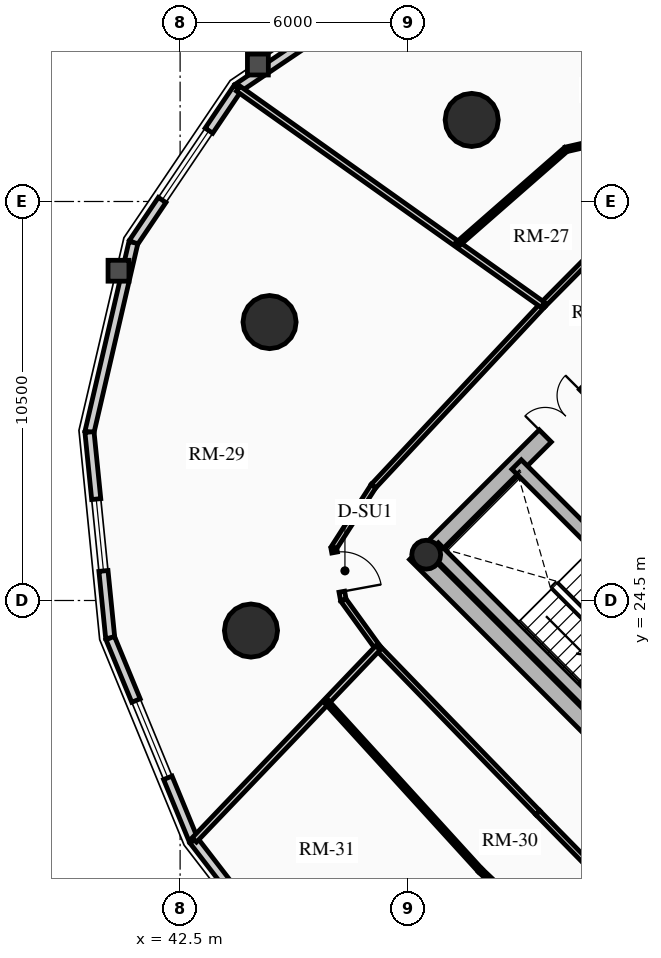
"""IFC4 building model, lengths in metres.
Left out: names, types, materials, properties, quantities, classifications, styles, units other than length and angle.
Written with IfcOpenShell. Run it as: python <this file> out.ifc"""

import sys

from ifc_helpers import new_model, si_unit, direction, frame, frame_2d, origin, origin_2d, place, context, subcontext, project, spatial, rectangle, circle, hollow_circle, extrude, source, transform, mapped, element, fill, save


model = new_model("IFC4")
c1 = context("Model", 3, precision=1e-05, world=origin(), true_north=direction((0.0, 1.0)))
c2 = subcontext(c1, "Body", "Model", "MODEL_VIEW")
j1 = project(units=[si_unit("LENGTHUNIT", "METRE"), si_unit("PLANEANGLEUNIT", "RADIAN")], contexts=[c1])
p1 = place(None, origin())
s1 = spatial("IfcSite", under=j1, at=p1, CompositionType="ELEMENT")
p2 = place(p1, origin())
s2 = spatial("IfcBuilding", under=s1, at=p2, CompositionType="ELEMENT")
p3 = place(p2, frame((0.0, 0.0, 107.98)))
s3 = spatial("IfcBuildingStorey", under=s2, at=p3, CompositionType="ELEMENT", Elevation=107.98)
p4 = place(p3, frame((58.737, 15.697, 0.0), z_axis=(0.0, 0.0, 1.0), x_axis=(-0.707106781187, 0.707106781187, 0.0)))
e1 = element("IfcWall", 1, at=p4, inside=s3, PredefinedType="SHEAR", context=c2, shape_type="SweptSolid", body=[
    extrude(rectangle(XDim=14.2, YDim=0.45, at=frame_2d((7.1, 0.0))), origin(), (0.0, 0.0, 1.0), 2.91),
])
p5 = place(p3, frame((48.856, 25.578, 0.0), z_axis=(0.0, 0.0, 1.0), x_axis=(0.707106781187, 0.707106781187, 0.0)))
e2 = element("IfcWall", 2, at=p5, inside=s3, PredefinedType="SHEAR", context=c2, shape_type="SweptSolid", body=[
    extrude(rectangle(XDim=10.7, YDim=0.45, at=frame_2d((5.35, 0.0))), origin(), (0.0, 0.0, 1.0), 2.91),
])
m1 = source(origin(), c2, "Body", "SweptSolid", [
    extrude(rectangle(XDim=1.5, YDim=2.02, at=frame_2d((0.75, 1.01))), frame((0.0, 0.235, 0.0), z_axis=(0.0, -1.0, 0.0), x_axis=(1.0, 0.0, 0.0)), (0.0, 0.0, 1.0), 0.47),
])
p6 = place(p5, frame((4.6, 0.0, 0.0)))
e3 = element("IfcOpeningElement", 3, at=p6, cuts=e2, PredefinedType="OPENING", context=c2, shape_type="MappedRepresentation", body=[
    mapped(m1, transform((0.0, 0.0, 0.0), x_axis=(1.0, 0.0, 0.0), y_axis=(0.0, 1.0, 0.0), z_axis=(0.0, 0.0, 1.0), scale=1.0)),
])
p7 = place(p3, frame((61.078, 18.355, 0.0), z_axis=(0.0, 0.0, 1.0), x_axis=(-0.707106781187, 0.707106781187, 0.0)))
e4 = element("IfcWall", 4, at=p7, inside=s3, PredefinedType="SHEAR", context=c2, shape_type="SweptSolid", body=[
    extrude(rectangle(XDim=13.75, YDim=0.35, at=frame_2d((6.875, 0.0))), origin(), (0.0, 0.0, 1.0), 2.91),
])
m2 = source(origin(), c2, "Body", "SweptSolid", [
    extrude(rectangle(XDim=1.1, YDim=2.015, at=frame_2d((0.55, 1.007))), frame((0.0, 0.185, 0.0), z_axis=(0.0, -1.0, 0.0), x_axis=(1.0, 0.0, 0.0)), (0.0, 0.0, 1.0), 0.37),
])
p8 = place(p7, frame((4.875, 0.0, 0.0)))
e5 = element("IfcOpeningElement", 5, at=p8, cuts=e4, PredefinedType="OPENING", context=c2, shape_type="MappedRepresentation", body=[
    mapped(m2, transform((0.0, 0.0, 0.0), x_axis=(1.0, 0.0, 0.0), y_axis=(0.0, 1.0, 0.0), z_axis=(0.0, 0.0, 1.0), scale=1.0)),
])
m3 = source(origin(), c2, "Body", "SweptSolid", [
    extrude(rectangle(XDim=1.15, YDim=2.02, at=frame_2d((0.575, 1.01))), frame((0.0, 0.185, 0.0), z_axis=(0.0, -1.0, 0.0), x_axis=(1.0, 0.0, 0.0)), (0.0, 0.0, 1.0), 0.37),
])
p9 = place(p7, frame((7.295, 0.0, 0.0)))
e6 = element("IfcOpeningElement", 6, at=p9, cuts=e4, PredefinedType="OPENING", context=c2, shape_type="MappedRepresentation", body=[
    mapped(m3, transform((0.0, 0.0, 0.0), x_axis=(1.0, 0.0, 0.0), y_axis=(0.0, 1.0, 0.0), z_axis=(0.0, 0.0, 1.0), scale=1.0)),
])
p10 = place(p3, frame((53.922, 21.141, 0.0), z_axis=(0.0, 0.0, 1.0), x_axis=(-0.707088616009, 0.707124945897, 0.0)))
e7 = element("IfcWall", 7, at=p10, inside=s3, PredefinedType="SHEAR", context=c2, shape_type="SweptSolid", body=[
    extrude(rectangle(XDim=6.72, YDim=0.35, at=frame_2d((3.36, 0.0))), origin(), (0.0, 0.0, 1.0), 2.91),
])
p11 = place(p3, frame((48.976, 25.706, 0.0), z_axis=(0.0, 0.0, 1.0), x_axis=(0.707106781187, 0.707106781187, 0.0)))
e8 = element("IfcColumn", 8, at=p11, inside=s3, PredefinedType="COLUMN", context=c2, shape_type="SweptSolid", body=[
    extrude(hollow_circle(Radius=0.38, WallThickness=0.032, at=origin_2d()), origin(), (0.0, 0.0, 1.0), 2.91),
])
for number, where, z_axis, x_axis in (
    (9, (50.173, 37.146, 0.0), (0.0, 0.0, 1.0), (1.0, 0.0, 0.0)),
    (10, (44.854, 31.827, 0.0), (0.0, 0.0, 1.0), (1.0, 0.0, 0.0)),
    (11, (44.365, 23.709, 0.0), (0.0, 0.0, 1.0), (1.0, 0.0, 0.0)),
):
    element("IfcColumn", number, at=place(p3, frame(where, z_axis=z_axis, x_axis=x_axis)), inside=s3, PredefinedType="USERDEFINED", context=c2, shape_type="SweptSolid", body=[
        extrude(circle(Radius=0.7, at=origin_2d()), origin(), (0.0, 0.0, 1.0), 2.91),
    ])
p12 = place(p3, frame((44.015, 37.985, 0.0), z_axis=(0.0, 0.0, 1.0), x_axis=(0.828781148131, 0.559572880421, 0.0)))
e12 = element("IfcWall", 12, at=p12, inside=s3, PredefinedType="SOLIDWALL", context=c2, shape_type="SweptSolid", body=[
    extrude(rectangle(XDim=4.905, YDim=0.24, at=frame_2d((2.452, 0.0))), origin(), (0.0, 0.0, 1.0), 2.179),
])
p13 = place(p3, frame((41.271, 33.92, 0.0), z_axis=(0.0, 0.0, 1.0), x_axis=(0.559572880421, 0.828781148131, 0.0)))
e13 = element("IfcWall", 13, at=p13, inside=s3, PredefinedType="SOLIDWALL", context=c2, shape_type="SweptSolid", body=[
    extrude(rectangle(XDim=4.905, YDim=0.24, at=frame_2d((2.452, 0.0))), origin(), (0.0, 0.0, 1.0), 2.179),
])
m4 = source(origin(), c2, "Body", "SweptSolid", [
    extrude(rectangle(XDim=2.2, YDim=1.35, at=frame_2d((1.1, 0.675))), frame((0.0, 0.13, 0.0), z_axis=(0.0, -1.0, 0.0), x_axis=(1.0, 0.0, 0.0)), (0.0, 0.0, 1.0), 0.26),
])
p14 = place(p13, frame((1.352, 0.0, 0.65)))
e14 = element("IfcOpeningElement", 14, at=p14, cuts=e13, PredefinedType="OPENING", context=c2, shape_type="MappedRepresentation", body=[
    mapped(m4, transform((0.0, 0.0, 0.0), x_axis=(1.0, 0.0, 0.0), y_axis=(0.0, 1.0, 0.0), z_axis=(0.0, 0.0, 1.0), scale=1.0)),
])
p15 = place(p3, frame((40.115, 28.933, 0.0), z_axis=(0.0, 0.0, 1.0), x_axis=(0.225834725257, 0.974165631126, 0.0)))
e15 = element("IfcWall", 15, at=p15, inside=s3, PredefinedType="SOLIDWALL", context=c2, shape_type="SweptSolid", body=[
    extrude(rectangle(XDim=5.119, YDim=0.24, at=frame_2d((2.56, 0.0))), origin(), (0.0, 0.0, 1.0), 2.179),
])
p16 = place(p3, frame((40.661, 23.513, 0.0), z_axis=(0.0, 0.0, 1.0), x_axis=(-0.10015591906, 0.994971754311, 0.0)))
e16 = element("IfcWall", 16, at=p16, inside=s3, PredefinedType="SOLIDWALL", context=c2, shape_type="SweptSolid", body=[
    extrude(rectangle(XDim=5.448, YDim=0.24, at=frame_2d((2.724, 0.0))), origin(), (0.0, 0.0, 1.0), 2.179),
])
m5 = source(origin(), c2, "Body", "SweptSolid", [
    extrude(rectangle(XDim=1.9, YDim=1.35, at=frame_2d((0.95, 0.675))), frame((0.0, 0.13, 0.0), z_axis=(0.0, -1.0, 0.0), x_axis=(1.0, 0.0, 0.0)), (0.0, 0.0, 1.0), 0.26),
])
p17 = place(p16, frame((1.774, 0.0, 0.65)))
e17 = element("IfcOpeningElement", 17, at=p17, cuts=e16, PredefinedType="OPENING", context=c2, shape_type="MappedRepresentation", body=[
    mapped(m5, transform((0.0, 0.0, 0.0), x_axis=(1.0, 0.0, 0.0), y_axis=(0.0, 1.0, 0.0), z_axis=(0.0, 0.0, 1.0), scale=1.0)),
])
p18 = place(p3, frame((42.855, 18.189, 0.0), z_axis=(0.0, 0.0, 1.0), x_axis=(-0.381027003055, 0.924563909604, 0.0)))
e18 = element("IfcWall", 18, at=p18, inside=s3, PredefinedType="SOLIDWALL", context=c2, shape_type="SweptSolid", body=[
    extrude(rectangle(XDim=5.758, YDim=0.24, at=frame_2d((2.879, 0.0))), origin(), (0.0, 0.0, 1.0), 2.179),
])
p19 = place(p18, frame((1.779, 0.0, 0.65)))
e19 = element("IfcOpeningElement", 19, at=p19, cuts=e18, PredefinedType="OPENING", context=c2, shape_type="MappedRepresentation", body=[
    mapped(m4, transform((0.0, 0.0, 0.0), x_axis=(1.0, 0.0, 0.0), y_axis=(0.0, 1.0, 0.0), z_axis=(0.0, 0.0, 1.0), scale=1.0)),
])
p20 = place(p3, frame((46.483, 13.483, 0.0), z_axis=(0.0, 0.0, 1.0), x_axis=(-0.61054437102, 0.791982052206, 0.0)))
e20 = element("IfcWall", 20, at=p20, inside=s3, PredefinedType="SOLIDWALL", context=c2, shape_type="SweptSolid", body=[
    extrude(rectangle(XDim=5.942, YDim=0.24, at=frame_2d((2.971, 0.0))), origin(), (0.0, 0.0, 1.0), 2.179),
])
p21 = place(p3, frame((54.427, 34.683, 0.0), z_axis=(0.0, 0.0, 1.0), x_axis=(-0.704178989986, -0.710022499687, 0.0)))
e21 = element("IfcWall", 21, at=p21, inside=s3, PredefinedType="PARTITIONING", context=c2, shape_type="SweptSolid", body=[
    extrude(rectangle(XDim=3.384, YDim=0.15, at=frame_2d((1.692, 0.0))), origin(), (0.0, 0.0, 1.0), 2.225),
])
p22 = place(p3, frame((52.043, 32.28, 0.0), z_axis=(0.0, 0.0, 1.0), x_axis=(-0.682606081633, -0.730786519661, 0.0)))
e22 = element("IfcWall", 22, at=p22, inside=s3, PredefinedType="PARTITIONING", context=c2, shape_type="SweptSolid", body=[
    extrude(rectangle(XDim=6.527, YDim=0.15, at=frame_2d((3.263, 0.0))), origin(), (0.0, 0.0, 1.0), 2.225),
])
p23 = place(p3, frame((47.588, 27.51, 0.0), z_axis=(0.0, 0.0, 1.0), x_axis=(-0.540202619347, -0.841534984449, 0.0)))
e23 = element("IfcWall", 23, at=p23, inside=s3, PredefinedType="PARTITIONING", context=c2, shape_type="SweptSolid", body=[
    extrude(rectangle(XDim=1.935, YDim=0.15, at=frame_2d((0.967, 0.0))), origin(), (0.0, 0.0, 1.0), 2.225),
])
p24 = place(p3, frame((46.543, 25.882, 0.0), z_axis=(0.0, 0.0, 1.0), x_axis=(0.181153502579, -0.983454832976, 0.0)))
e24 = element("IfcWall", 24, at=p24, inside=s3, PredefinedType="PARTITIONING", context=c2, shape_type="SweptSolid", body=[
    extrude(rectangle(XDim=1.392, YDim=0.15, at=frame_2d((0.696, 0.0))), origin(), (0.0, 0.0, 1.0), 2.225),
])
m6 = source(origin(), c2, "Body", "SweptSolid", [
    extrude(rectangle(XDim=1.05, YDim=2.015, at=frame_2d((0.525, 1.007))), frame((0.0, 0.085, 0.0), z_axis=(0.0, -1.0, 0.0), x_axis=(1.0, 0.0, 0.0)), (0.0, 0.0, 1.0), 0.17),
])
p25 = place(p24, frame((0.12, 0.0, 0.0)))
e25 = element("IfcOpeningElement", 25, at=p25, cuts=e24, PredefinedType="OPENING", context=c2, shape_type="MappedRepresentation", body=[
    mapped(m6, transform((0.0, 0.0, 0.0), x_axis=(1.0, 0.0, 0.0), y_axis=(0.0, 1.0, 0.0), z_axis=(0.0, 0.0, 1.0), scale=1.0)),
])
p26 = place(p3, frame((46.795, 24.513, 0.0), z_axis=(0.0, 0.0, 1.0), x_axis=(0.585628197524, -0.810579801294, 0.0)))
e26 = element("IfcWall", 26, at=p26, inside=s3, PredefinedType="PARTITIONING", context=c2, shape_type="SweptSolid", body=[
    extrude(rectangle(XDim=1.554, YDim=0.15, at=frame_2d((0.777, 0.0))), origin(), (0.0, 0.0, 1.0), 2.225),
])
p27 = place(p3, frame((47.706, 23.253, 0.0), z_axis=(0.0, 0.0, 1.0), x_axis=(0.696179266346, -0.717867974707, 0.0)))
e27 = element("IfcWall", 27, at=p27, inside=s3, PredefinedType="PARTITIONING", context=c2, shape_type="SweptSolid", body=[
    extrude(rectangle(XDim=6.045, YDim=0.15, at=frame_2d((3.022, 0.0))), origin(), (0.0, 0.0, 1.0), 2.655),
])
p28 = place(p3, frame((51.914, 18.914, 0.0), z_axis=(0.0, 0.0, 1.0), x_axis=(0.699999313799, -0.714143515465, 0.0)))
e28 = element("IfcWall", 28, at=p28, inside=s3, PredefinedType="PARTITIONING", context=c2, shape_type="SweptSolid", body=[
    extrude(rectangle(XDim=6.162, YDim=0.15, at=frame_2d((3.081, 0.0))), origin(), (0.0, 0.0, 1.0), 2.225),
])
p29 = place(p3, frame((52.043, 32.28, 0.0), z_axis=(0.0, 0.0, 1.0), x_axis=(-0.81534487613, 0.578975589268, 0.0)))
e29 = element("IfcWall", 29, at=p29, inside=s3, PredefinedType="PARTITIONING", context=c2, shape_type="SweptSolid", body=[
    extrude(rectangle(XDim=9.829, YDim=0.16, at=frame_2d((4.915, 0.0))), origin(), (0.0, 0.0, 1.0), 2.179),
])
p30 = place(p3, frame((47.706, 23.253, 0.0), z_axis=(0.0, 0.0, 1.0), x_axis=(-0.691027649154, -0.722828325472, 0.0)))
e30 = element("IfcWall", 30, at=p30, inside=s3, PredefinedType="PARTITIONING", context=c2, shape_type="SweptSolid", body=[
    extrude(rectangle(XDim=6.994, YDim=0.16, at=frame_2d((3.497, 0.0))), origin(), (0.0, 0.0, 1.0), 2.179),
])
p31 = place(p3, frame((55.168, 36.948, 0.0), z_axis=(0.0, 0.0, 1.0), x_axis=(-0.974677367116, -0.223615808993, 0.0)))
e31 = element("IfcWall", 31, at=p31, inside=s3, PredefinedType="PARTITIONING", context=c2, shape_type="SweptSolid", body=[
    extrude(rectangle(XDim=2.581, YDim=0.125, at=frame_2d((1.291, 0.0))), origin(), (0.0, 0.0, 1.0), 2.225),
])
m7 = source(origin(), c2, "Body", "SweptSolid", [
    extrude(rectangle(XDim=0.9, YDim=2.005, at=frame_2d((0.45, 1.002))), frame((0.0, 0.073, 0.0), z_axis=(0.0, -1.0, 0.0), x_axis=(1.0, 0.0, 0.0)), (0.0, 0.0, 1.0), 0.145),
])
p32 = place(p31, frame((0.841, 0.0, 0.0)))
e32 = element("IfcOpeningElement", 32, at=p32, cuts=e31, PredefinedType="OPENING", context=c2, shape_type="MappedRepresentation", body=[
    mapped(m7, transform((0.0, 0.0, 0.0), x_axis=(1.0, 0.0, 0.0), y_axis=(0.0, 1.0, 0.0), z_axis=(0.0, 0.0, 1.0), scale=1.0)),
])
p33 = place(p3, frame((52.652, 36.371, 0.0), z_axis=(0.0, 0.0, 1.0), x_axis=(-0.752401146533, -0.658705180408, 0.0)))
e33 = element("IfcWall", 33, at=p33, inside=s3, PredefinedType="PARTITIONING", context=c2, shape_type="SweptSolid", body=[
    extrude(rectangle(XDim=3.791, YDim=0.125, at=frame_2d((1.896, 0.0))), origin(), (0.0, 0.0, 1.0), 2.225),
])
p34 = place(p3, frame((46.352, 21.838, 0.0), z_axis=(0.0, 0.0, 1.0), x_axis=(0.673416949194, -0.739262884594, 0.0)))
e34 = element("IfcWall", 34, at=p34, inside=s3, PredefinedType="PARTITIONING", context=c2, shape_type="SweptSolid", body=[
    extrude(rectangle(XDim=6.007, YDim=0.125, at=frame_2d((3.003, 0.0))), origin(), (0.0, 0.0, 1.0), 2.655),
])
p35 = place(p3, frame((50.397, 17.397, 0.0), z_axis=(0.0, 0.0, 1.0), x_axis=(0.726427828833, -0.687242758781, 0.0)))
e35 = element("IfcWall", 35, at=p35, inside=s3, PredefinedType="PARTITIONING", context=c2, shape_type="SweptSolid", body=[
    extrude(rectangle(XDim=6.087, YDim=0.125, at=frame_2d((3.043, 0.0))), origin(), (0.0, 0.0, 1.0), 2.225),
])
p36 = place(p35, frame((2.594, 0.0, 0.0)))
e36 = element("IfcOpeningElement", 36, at=p36, cuts=e35, PredefinedType="OPENING", context=c2, shape_type="MappedRepresentation", body=[
    mapped(m7, transform((0.0, 0.0, 0.0), x_axis=(1.0, 0.0, 0.0), y_axis=(0.0, 1.0, 0.0), z_axis=(0.0, 0.0, 1.0), scale=1.0)),
])
m8 = source(origin(), c2, "Body", "SweptSolid", [
    extrude(rectangle(XDim=2.2, YDim=1.35, at=frame_2d((1.1, 0.675))), frame((0.0, 0.03, 0.0), z_axis=(0.0, -1.0, 0.0), x_axis=(1.0, 0.0, 0.0)), (0.0, 0.0, 1.0), 0.06),
])
p37 = place(p14, origin())
e37 = element("IfcWindow", 37, at=p37, inside=s3, PartitioningType="DOUBLE_PANEL_VERTICAL", PredefinedType="WINDOW", context=c2, shape_type="MappedRepresentation", body=[
    mapped(m8, transform((0.0, 0.0, 0.0), x_axis=(1.0, 0.0, 0.0), y_axis=(0.0, 1.0, 0.0), z_axis=(0.0, 0.0, 1.0), scale=1.0)),
])
fill(e14, e37)
m9 = source(origin(), c2, "Body", "SweptSolid", [
    extrude(rectangle(XDim=1.9, YDim=1.35, at=frame_2d((0.95, 0.675))), frame((0.0, 0.03, 0.0), z_axis=(0.0, -1.0, 0.0), x_axis=(1.0, 0.0, 0.0)), (0.0, 0.0, 1.0), 0.06),
])
p38 = place(p17, origin())
e38 = element("IfcWindow", 38, at=p38, inside=s3, PartitioningType="DOUBLE_PANEL_VERTICAL", PredefinedType="WINDOW", context=c2, shape_type="MappedRepresentation", body=[
    mapped(m9, transform((0.0, 0.0, 0.0), x_axis=(1.0, 0.0, 0.0), y_axis=(0.0, 1.0, 0.0), z_axis=(0.0, 0.0, 1.0), scale=1.0)),
])
fill(e17, e38)
p39 = place(p19, origin())
e39 = element("IfcWindow", 39, at=p39, inside=s3, PartitioningType="DOUBLE_PANEL_VERTICAL", PredefinedType="WINDOW", context=c2, shape_type="MappedRepresentation", body=[
    mapped(m8, transform((0.0, 0.0, 0.0), x_axis=(1.0, 0.0, 0.0), y_axis=(0.0, 1.0, 0.0), z_axis=(0.0, 0.0, 1.0), scale=1.0)),
])
fill(e19, e39)
m10 = source(origin(), c2, "Body", "SweptSolid", [
    extrude(rectangle(XDim=1.5, YDim=2.02, at=frame_2d((0.75, 1.01))), frame((0.0, 0.025, 0.0), z_axis=(0.0, -1.0, 0.0), x_axis=(1.0, 0.0, 0.0)), (0.0, 0.0, 1.0), 0.05),
])
p40 = place(p6, origin())
e40 = element("IfcDoor", 40, at=p40, inside=s3, OperationType="DOUBLE_DOOR_SINGLE_SWING", PredefinedType="DOOR", context=c2, shape_type="MappedRepresentation", body=[
    mapped(m10, transform((0.0, 0.0, 0.0), x_axis=(1.0, 0.0, 0.0), y_axis=(0.0, 1.0, 0.0), z_axis=(0.0, 0.0, 1.0), scale=1.0)),
])
fill(e3, e40)
m11 = source(origin(), c2, "Body", "SweptSolid", [
    extrude(rectangle(XDim=1.05, YDim=2.015, at=frame_2d((0.525, 1.007))), frame((0.0, 0.025, 0.0), z_axis=(0.0, -1.0, 0.0), x_axis=(1.0, 0.0, 0.0)), (0.0, 0.0, 1.0), 0.05),
])
p41 = place(p25, origin())
e41 = element("IfcDoor", 41, at=p41, inside=s3, OperationType="SINGLE_SWING_RIGHT", PredefinedType="DOOR", context=c2, shape_type="MappedRepresentation", body=[
    mapped(m11, transform((0.0, 0.0, 0.0), x_axis=(1.0, 0.0, 0.0), y_axis=(0.0, 1.0, 0.0), z_axis=(0.0, 0.0, 1.0), scale=1.0)),
])
fill(e25, e41)
save(model, sys.argv[1])
